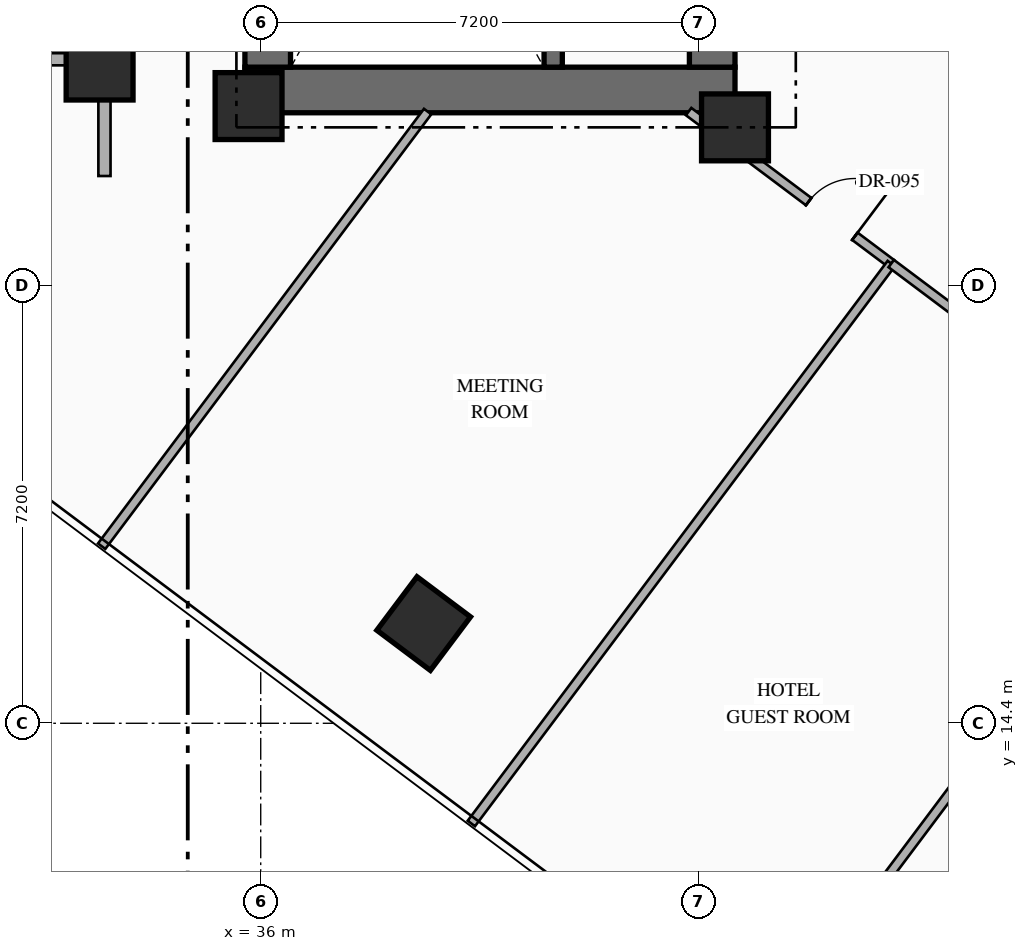
"""IFC4 building model, lengths in metres.
Left out: names, types, materials, properties, quantities, classifications, styles, units other than length and angle.
Written with IfcOpenShell. Run it as: python <this file> out.ifc"""

import sys

from ifc_helpers import new_model, si_unit, direction, frame, frame_2d, origin, origin_2d, place, context, subcontext, project, spatial, rectangle, hollow_rectangle, extrude, element, fill, save


model = new_model("IFC4")
c1 = context("Model", 3, precision=1e-05, world=origin(), true_north=direction((0.0, 1.0)))
c2 = subcontext(c1, "Body", "Model", "MODEL_VIEW")
j1 = project(units=[si_unit("LENGTHUNIT", "METRE"), si_unit("PLANEANGLEUNIT", "RADIAN")], contexts=[c1])
p1 = place(None, origin())
s1 = spatial("IfcSite", under=j1, at=p1, CompositionType="ELEMENT")
p2 = place(p1, origin())
s2 = spatial("IfcBuilding", under=s1, at=p2, CompositionType="ELEMENT")
p3 = place(p2, frame((0.0, 0.0, 66.75)))
s3 = spatial("IfcBuildingStorey", under=s2, at=p3, CompositionType="ELEMENT", Elevation=66.75)
p4 = place(p3, frame((35.74, 24.815, 0.0), z_axis=(0.0, 0.0, 1.0), x_axis=(1.0, 0.0, 0.0)))
e1 = element("IfcWall", 1, at=p4, inside=s3, PredefinedType="SHEAR", context=c2, shape_type="SweptSolid", body=[
    extrude(rectangle(XDim=8.06, YDim=0.75, at=frame_2d((4.03, 0.0))), origin(), (0.0, 0.0, 1.0), 3.35),
])
p5 = place(p3, frame((36.115, 25.19, 0.0), z_axis=(0.0, 0.0, 1.0), x_axis=(0.0, 1.0, 0.0)))
e2 = element("IfcWall", 2, at=p5, inside=s3, PredefinedType="SHEAR", context=c2, shape_type="SweptSolid", body=[
    extrude(rectangle(XDim=9.48, YDim=0.75, at=frame_2d((4.74, 0.0))), origin(), (0.0, 0.0, 1.0), 3.35),
])
p6 = place(p3, frame((43.425, 25.19, 0.0), z_axis=(0.0, 0.0, 1.0), x_axis=(0.0, 1.0, 0.0)))
e3 = element("IfcWall", 3, at=p6, inside=s3, PredefinedType="SHEAR", context=c2, shape_type="SweptSolid", body=[
    extrude(rectangle(XDim=9.48, YDim=0.75, at=frame_2d((4.74, 0.0))), origin(), (0.0, 0.0, 1.0), 3.35),
])
p7 = place(p6, frame((1.21, 0.0, 0.0)))
e4 = element("IfcOpeningElement", 4, at=p7, cuts=e3, PredefinedType="OPENING", context=c2, shape_type="SweptSolid", body=[
    extrude(rectangle(XDim=0.85, YDim=2.08, at=frame_2d((0.425, 1.04))), frame((0.0, 0.385, 0.0), z_axis=(0.0, -1.0, 0.0), x_axis=(1.0, 0.0, 0.0)), (0.0, 0.0, 1.0), 0.77),
])
p8 = place(p6, frame((4.46, 0.0, 0.0)))
e5 = element("IfcOpeningElement", 5, at=p8, cuts=e3, PredefinedType="OPENING", context=c2, shape_type="SweptSolid", body=[
    extrude(rectangle(XDim=0.85, YDim=2.08, at=frame_2d((0.425, 1.04))), frame((0.0, 0.385, 0.0), z_axis=(0.0, -1.0, 0.0), x_axis=(1.0, 0.0, 0.0)), (0.0, 0.0, 1.0), 0.77),
])
p9 = place(p3, frame((40.81, 25.19, 0.0), z_axis=(0.0, 0.0, 1.0), x_axis=(0.0, 1.0, 0.0)))
e6 = element("IfcWall", 6, at=p9, inside=s3, PredefinedType="SHEAR", context=c2, shape_type="SweptSolid", body=[
    extrude(rectangle(XDim=9.48, YDim=0.3, at=frame_2d((4.74, 0.0))), origin(), (0.0, 0.0, 1.0), 3.35),
])
for number, where, z_axis, x_axis in (
    (7, (35.8, 24.55, 0.0), (0.0, 0.0, 1.0), (1.0, 0.0, 0.0)),
    (8, (43.8, 24.2, 0.0), (0.0, 0.0, 1.0), (1.0, 0.0, 0.0)),
):
    element("IfcColumn", number, at=place(p3, frame(where, z_axis=z_axis, x_axis=x_axis)), inside=s3, PredefinedType="COLUMN", context=c2, shape_type="SweptSolid", body=[
        extrude(rectangle(XDim=1.1, YDim=1.1, at=origin_2d()), origin(), (0.0, 0.0, 1.0), 3.35),
    ])
for number, where, z_axis, x_axis in (
    (9, (33.35, 25.2, 0.0), (0.0, 0.0, 1.0), (1.0, 0.0, 0.0)),
    (10, (38.68, 16.04, 0.0), (0.0, 0.0, 1.0), (0.8, -0.6, 0.0)),
):
    element("IfcColumn", number, at=place(p3, frame(where, z_axis=z_axis, x_axis=x_axis)), inside=s3, PredefinedType="COLUMN", context=c2, shape_type="SweptSolid", body=[
        extrude(hollow_rectangle(XDim=1.1, YDim=1.1, WallThickness=0.04, at=origin_2d()), origin(), (0.0, 0.0, 1.0), 3.35),
    ])
p10 = place(p3, frame((44.86, 40.73, 0.0), z_axis=(0.0, 0.0, 1.0), x_axis=(0.800006902154, -0.599990797017, 0.0)))
e11 = element("IfcWall", 11, at=p10, inside=s3, PredefinedType="STANDARD", context=c2, shape_type="SweptSolid", body=[
    extrude(rectangle(XDim=29.712, YDim=0.28, at=frame_2d((14.856, 0.0))), origin(), (0.0, 0.0, 1.0), 3.09),
])
p11 = place(p10, frame((14.249, 0.0, 0.0)))
e12 = element("IfcOpeningElement", 12, at=p11, cuts=e11, PredefinedType="OPENING", context=c2, shape_type="SweptSolid", body=[
    extrude(rectangle(XDim=1.1, YDim=2.2, at=frame_2d((0.55, 1.1))), frame((0.0, 0.15, 0.0), z_axis=(0.0, -1.0, 0.0), x_axis=(1.0, 0.0, 0.0)), (0.0, 0.0, 1.0), 0.3),
])
p12 = place(p10, frame((1.612, 0.0, 0.85)))
e13 = element("IfcOpeningElement", 13, at=p12, cuts=e11, PredefinedType="OPENING", context=c2, shape_type="SweptSolid", body=[
    extrude(rectangle(XDim=1.4, YDim=1.8, at=frame_2d((0.7, 0.9))), frame((0.0, 0.15, 0.0), z_axis=(0.0, -1.0, 0.0), x_axis=(1.0, 0.0, 0.0)), (0.0, 0.0, 1.0), 0.3),
])
p13 = place(p10, frame((5.667, 0.0, 0.85)))
e14 = element("IfcOpeningElement", 14, at=p13, cuts=e11, PredefinedType="OPENING", context=c2, shape_type="SweptSolid", body=[
    extrude(rectangle(XDim=1.4, YDim=1.8, at=frame_2d((0.7, 0.9))), frame((0.0, 0.15, 0.0), z_axis=(0.0, -1.0, 0.0), x_axis=(1.0, 0.0, 0.0)), (0.0, 0.0, 1.0), 0.3),
])
p14 = place(p10, frame((9.912, 0.0, 0.85)))
e15 = element("IfcOpeningElement", 15, at=p14, cuts=e11, PredefinedType="OPENING", context=c2, shape_type="SweptSolid", body=[
    extrude(rectangle(XDim=1.4, YDim=1.8, at=frame_2d((0.7, 0.9))), frame((0.0, 0.15, 0.0), z_axis=(0.0, -1.0, 0.0), x_axis=(1.0, 0.0, 0.0)), (0.0, 0.0, 1.0), 0.3),
])
p15 = place(p10, frame((19.743, 0.0, 0.85)))
e16 = element("IfcOpeningElement", 16, at=p15, cuts=e11, PredefinedType="OPENING", context=c2, shape_type="SweptSolid", body=[
    extrude(rectangle(XDim=1.4, YDim=1.8, at=frame_2d((0.7, 0.9))), frame((0.0, 0.15, 0.0), z_axis=(0.0, -1.0, 0.0), x_axis=(1.0, 0.0, 0.0)), (0.0, 0.0, 1.0), 0.3),
])
p16 = place(p10, frame((22.645, 0.0, 0.85)))
e17 = element("IfcOpeningElement", 17, at=p16, cuts=e11, PredefinedType="OPENING", context=c2, shape_type="SweptSolid", body=[
    extrude(rectangle(XDim=1.4, YDim=1.8, at=frame_2d((0.7, 0.9))), frame((0.0, 0.15, 0.0), z_axis=(0.0, -1.0, 0.0), x_axis=(1.0, 0.0, 0.0)), (0.0, 0.0, 1.0), 0.3),
])
p17 = place(p10, frame((26.7, 0.0, 0.85)))
e18 = element("IfcOpeningElement", 18, at=p17, cuts=e11, PredefinedType="OPENING", context=c2, shape_type="SweptSolid", body=[
    extrude(rectangle(XDim=1.4, YDim=1.8, at=frame_2d((0.7, 0.9))), frame((0.0, 0.15, 0.0), z_axis=(0.0, -1.0, 0.0), x_axis=(1.0, 0.0, 0.0)), (0.0, 0.0, 1.0), 0.3),
])
p18 = place(p3, frame((33.43, 23.4, 0.0), z_axis=(0.0, 0.0, 1.0), x_axis=(0.0, 1.0, 0.0)))
e19 = element("IfcWall", 19, at=p18, inside=s3, PredefinedType="STANDARD", context=c2, shape_type="SweptSolid", body=[
    extrude(rectangle(XDim=4.08, YDim=0.2, at=frame_2d((2.04, 0.0))), origin(), (0.0, 0.0, 1.0), 2.425),
])
p19 = place(p3, frame((25.55, 25.32, 0.0), z_axis=(0.0, 0.0, 1.0), x_axis=(1.0, 0.0, 0.0)))
e20 = element("IfcWall", 20, at=p19, inside=s3, PredefinedType="STANDARD", context=c2, shape_type="SweptSolid", body=[
    extrude(rectangle(XDim=7.88, YDim=0.2, at=frame_2d((3.94, 0.0))), origin(), (0.0, 0.0, 1.0), 2.525),
])
p20 = place(p3, frame((43.037, 24.46, 0.0), z_axis=(0.0, 0.0, 1.0), x_axis=(0.799971872363, -0.600037501685, 0.0)))
e21 = element("IfcWall", 21, at=p20, inside=s3, PredefinedType="PARTITIONING", context=c2, shape_type="SweptSolid", body=[
    extrude(rectangle(XDim=4.167, YDim=0.15, at=frame_2d((2.083, 0.0))), origin(), (0.0, 0.0, 1.0), 2.425),
])
p21 = place(p20, frame((2.468, 0.0, 0.0)))
e22 = element("IfcOpeningElement", 22, at=p21, cuts=e21, PredefinedType="OPENING", context=c2, shape_type="SweptSolid", body=[
    extrude(rectangle(XDim=0.95, YDim=2.15, at=frame_2d((0.475, 1.075))), frame((0.0, 0.085, 0.0), z_axis=(0.0, -1.0, 0.0), x_axis=(1.0, 0.0, 0.0)), (0.0, 0.0, 1.0), 0.17),
])
p22 = place(p3, frame((33.384, 17.312, 0.0), z_axis=(0.0, 0.0, 1.0), x_axis=(0.600008743659, 0.799993442181, 0.0)))
e23 = element("IfcWall", 23, at=p22, inside=s3, PredefinedType="PARTITIONING", context=c2, shape_type="SweptSolid", body=[
    extrude(rectangle(XDim=8.935, YDim=0.15, at=frame_2d((4.468, 0.0))), origin(), (0.0, 0.0, 1.0), 3.09),
])
p23 = place(p3, frame((39.464, 12.752, 0.0), z_axis=(0.0, 0.0, 1.0), x_axis=(0.6, 0.8, 0.0)))
e24 = element("IfcWall", 24, at=p23, inside=s3, PredefinedType="PARTITIONING", context=c2, shape_type="SweptSolid", body=[
    extrude(rectangle(XDim=11.51, YDim=0.15, at=frame_2d((5.755, 0.0))), origin(), (0.0, 0.0, 1.0), 3.09),
])
p24 = place(p3, frame((46.37, 21.96, 0.0), z_axis=(0.0, 0.0, 1.0), x_axis=(0.799977170108, -0.600030438649, 0.0)))
e25 = element("IfcWall", 25, at=p24, inside=s3, PredefinedType="PARTITIONING", context=c2, shape_type="SweptSolid", body=[
    extrude(rectangle(XDim=3.85, YDim=0.15, at=frame_2d((1.925, 0.0))), origin(), (0.0, 0.0, 1.0), 2.425),
])
p25 = place(p24, frame((1.45, 0.0, 0.0)))
e26 = element("IfcOpeningElement", 26, at=p25, cuts=e25, PredefinedType="OPENING", context=c2, shape_type="SweptSolid", body=[
    extrude(rectangle(XDim=0.95, YDim=2.15, at=frame_2d((0.475, 1.075))), frame((0.0, 0.085, 0.0), z_axis=(0.0, -1.0, 0.0), x_axis=(1.0, 0.0, 0.0)), (0.0, 0.0, 1.0), 0.17),
])
p26 = place(p3, frame((44.36, 9.28, 0.0), z_axis=(0.0, 0.0, 1.0), x_axis=(0.599986233332, 0.800010324816, 0.0)))
e27 = element("IfcWall", 27, at=p26, inside=s3, PredefinedType="PARTITIONING", context=c2, shape_type="SweptSolid", body=[
    extrude(rectangle(XDim=11.35, YDim=0.15, at=frame_2d((5.675, 0.0))), origin(), (0.0, 0.0, 1.0), 2.425),
])
p27 = place(p21, origin())
e28 = element("IfcDoor", 28, at=p27, inside=s3, OperationType="SINGLE_SWING_RIGHT", PredefinedType="DOOR", context=c2, shape_type="SweptSolid", body=[
    extrude(rectangle(XDim=0.95, YDim=2.15, at=frame_2d((0.475, 1.075))), frame((0.0, 0.025, 0.0), z_axis=(0.0, -1.0, 0.0), x_axis=(1.0, 0.0, 0.0)), (0.0, 0.0, 1.0), 0.05),
])
fill(e22, e28)
save(model, sys.argv[1])
